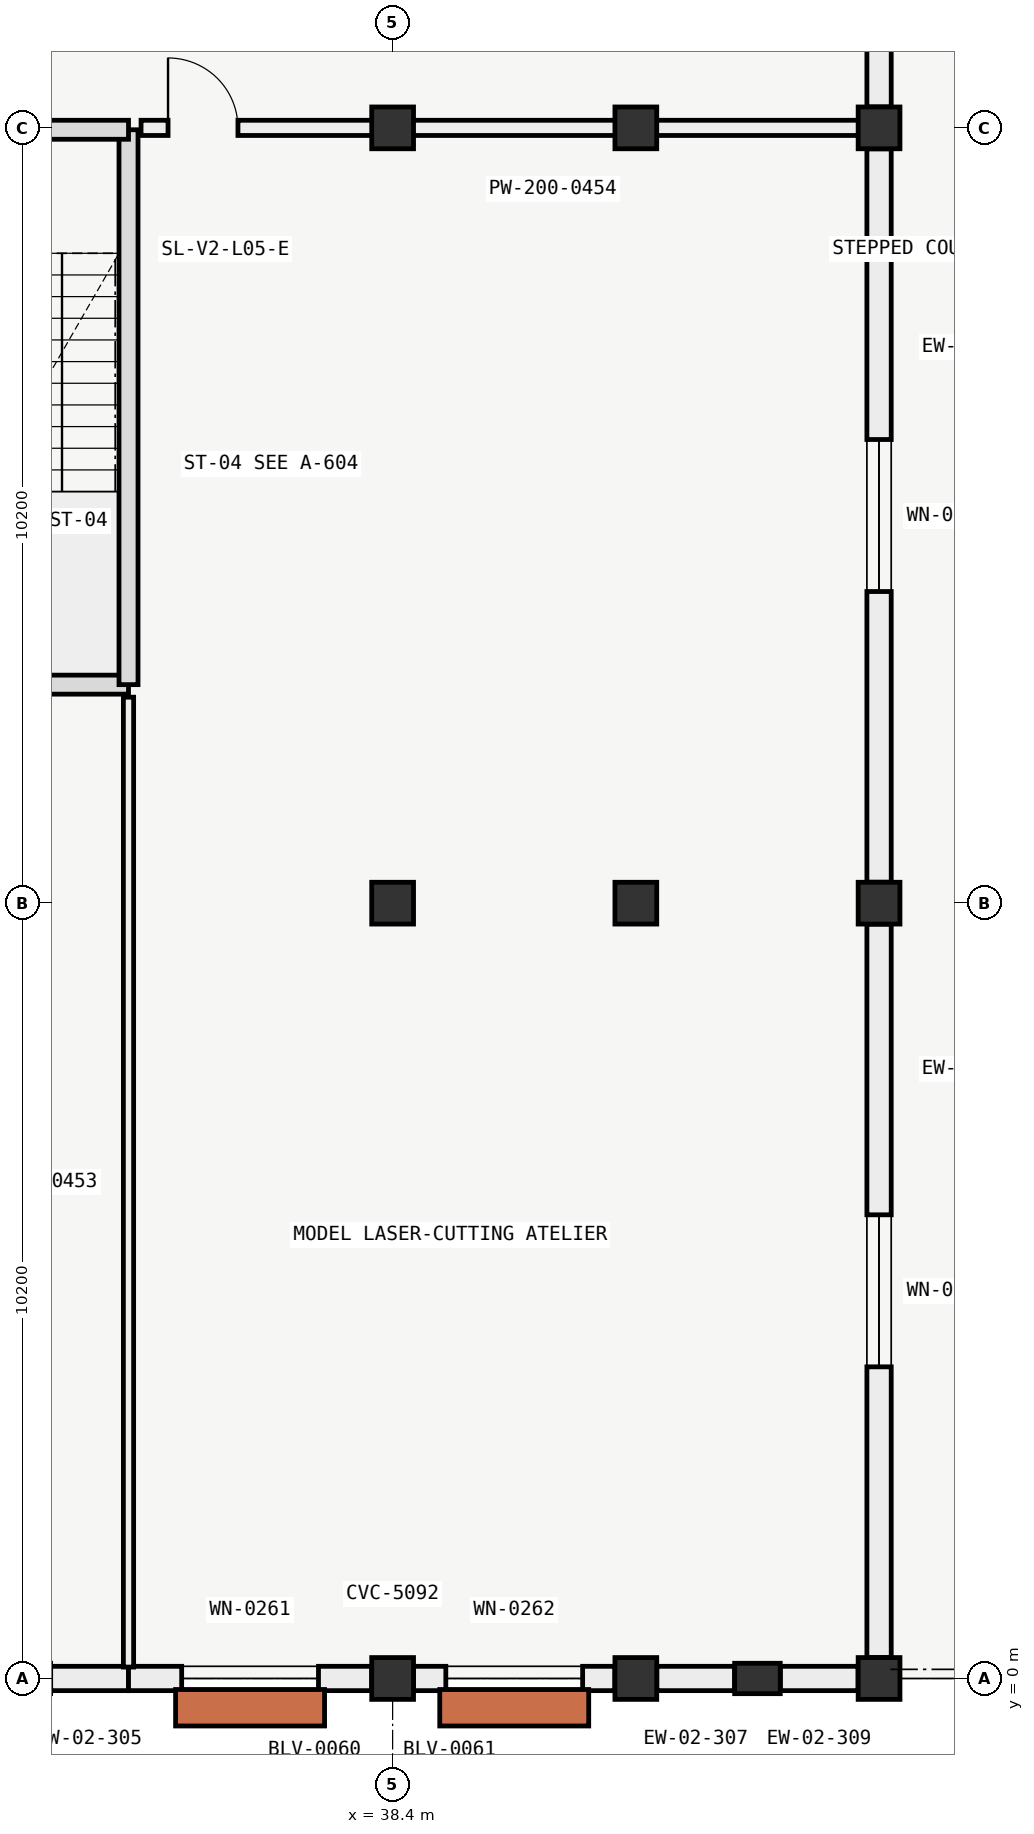
"""IFC4 building model, lengths in metres.
Left out: names, types, materials, properties, quantities, classifications, styles, units other than length and angle.
Written with IfcOpenShell. Run it as: python <this file> out.ifc"""

import sys

from ifc_helpers import new_model, si_unit, direction, frame, frame_2d, origin, origin_2d, place, context, subcontext, project, spatial, rectangle, extrude, element, fill, save


model = new_model("IFC4")
c1 = context("Model", 3, precision=1e-05, world=origin(), true_north=direction((0.0, 1.0)))
c2 = subcontext(c1, "Body", "Model", "MODEL_VIEW")
j1 = project(units=[si_unit("LENGTHUNIT", "METRE"), si_unit("PLANEANGLEUNIT", "RADIAN")], contexts=[c1])
p1 = place(None, origin())
s1 = spatial("IfcSite", under=j1, at=p1, CompositionType="ELEMENT")
p2 = place(p1, origin())
s2 = spatial("IfcBuilding", under=s1, at=p2, CompositionType="ELEMENT")
p3 = place(p2, frame((0.0, 0.0, 22.2)))
s3 = spatial("IfcBuildingStorey", under=s2, at=p3, CompositionType="ELEMENT", Elevation=22.2)
for number, where, z_axis, x_axis in (
    (1, (38.4, 0.0, 0.0), (0.0, 0.0, 1.0), (1.0, 0.0, 0.0)),
    (2, (38.4, 10.2, 0.0), (0.0, 0.0, 1.0), (1.0, 0.0, 0.0)),
    (3, (38.4, 20.4, 0.0), (0.0, 0.0, 1.0), (1.0, 0.0, 0.0)),
    (4, (41.6, 0.0, 0.0), (0.0, 0.0, 1.0), (1.0, 0.0, 0.0)),
    (5, (41.6, 10.2, 0.0), (0.0, 0.0, 1.0), (1.0, 0.0, 0.0)),
    (6, (41.6, 20.4, 0.0), (0.0, 0.0, 1.0), (1.0, 0.0, 0.0)),
    (7, (44.8, 0.0, 0.0), (0.0, 0.0, 1.0), (1.0, 0.0, 0.0)),
    (8, (44.8, 10.2, 0.0), (0.0, 0.0, 1.0), (1.0, 0.0, 0.0)),
    (9, (44.8, 20.4, 0.0), (0.0, 0.0, 1.0), (1.0, 0.0, 0.0)),
):
    element("IfcColumn", number, at=place(p3, frame(where, z_axis=z_axis, x_axis=x_axis)), inside=s3, PredefinedType="COLUMN", context=c2, shape_type="SweptSolid", body=[
        extrude(rectangle(XDim=0.55, YDim=0.55, at=origin_2d()), origin(), (0.0, 0.0, 1.0), 4.2),
    ])
p4 = place(p3, frame((43.2, 0.0, 0.0), z_axis=(0.0, 0.0, 1.0), x_axis=(0.0, 1.0, 0.0)))
e10 = element("IfcColumn", 10, at=p4, inside=s3, PredefinedType="PILASTER", context=c2, shape_type="SweptSolid", body=[
    extrude(rectangle(XDim=0.4, YDim=0.6, at=origin_2d()), origin(), (0.0, 0.0, 1.0), 4.2),
])
p5 = place(p3, frame((34.925, 0.0, 0.0), z_axis=(0.0, 0.0, 1.0), x_axis=(-1.0, 0.0, 0.0)))
e11 = element("IfcWall", 11, at=p5, inside=s3, PredefinedType="SOLIDWALL", context=c2, shape_type="SweptSolid", body=[
    extrude(rectangle(XDim=1.024, YDim=0.32, at=frame_2d((0.512, 0.0))), origin(), (0.0, 0.0, 1.0), 3.3),
])
p6 = place(p3, frame((38.124, 0.0, 0.0), z_axis=(0.0, 0.0, 1.0), x_axis=(-1.0, 0.0, 0.0)))
e12 = element("IfcWall", 12, at=p6, inside=s3, PredefinedType="SOLIDWALL", context=c2, shape_type="SweptSolid", body=[
    extrude(rectangle(XDim=3.199, YDim=0.32, at=frame_2d((1.6, 0.0))), origin(), (0.0, 0.0, 1.0), 3.3),
])
p7 = place(p6, frame((0.699, 0.0, 0.8)))
e13 = element("IfcOpeningElement", 13, at=p7, cuts=e12, PredefinedType="OPENING", context=c2, shape_type="SweptSolid", body=[
    extrude(rectangle(XDim=1.8, YDim=2.1, at=frame_2d((0.9, 1.05))), frame((0.0, 0.17, 0.0), z_axis=(0.0, -1.0, 0.0), x_axis=(1.0, 0.0, 0.0)), (0.0, 0.0, 1.0), 0.34),
])
p8 = place(p3, frame((42.899, 0.0, 0.0), z_axis=(0.0, 0.0, 1.0), x_axis=(-1.0, 0.0, 0.0)))
e14 = element("IfcWall", 14, at=p8, inside=s3, PredefinedType="SOLIDWALL", context=c2, shape_type="SweptSolid", body=[
    extrude(rectangle(XDim=1.023, YDim=0.32, at=frame_2d((0.511, 0.0))), origin(), (0.0, 0.0, 1.0), 3.3),
])
p9 = place(p3, frame((41.324, 0.0, 0.0), z_axis=(0.0, 0.0, 1.0), x_axis=(-1.0, 0.0, 0.0)))
e15 = element("IfcWall", 15, at=p9, inside=s3, PredefinedType="SOLIDWALL", context=c2, shape_type="SweptSolid", body=[
    extrude(rectangle(XDim=2.648, YDim=0.32, at=frame_2d((1.324, 0.0))), origin(), (0.0, 0.0, 1.0), 3.3),
])
p10 = place(p9, frame((0.424, 0.0, 0.8)))
e16 = element("IfcOpeningElement", 16, at=p10, cuts=e15, PredefinedType="OPENING", context=c2, shape_type="SweptSolid", body=[
    extrude(rectangle(XDim=1.8, YDim=2.1, at=frame_2d((0.9, 1.05))), frame((0.0, 0.17, 0.0), z_axis=(0.0, -1.0, 0.0), x_axis=(1.0, 0.0, 0.0)), (0.0, 0.0, 1.0), 0.34),
])
p11 = place(p3, frame((44.524, 0.0, 0.0), z_axis=(0.0, 0.0, 1.0), x_axis=(-1.0, 0.0, 0.0)))
e17 = element("IfcWall", 17, at=p11, inside=s3, PredefinedType="SOLIDWALL", context=c2, shape_type="SweptSolid", body=[
    extrude(rectangle(XDim=1.023, YDim=0.32, at=frame_2d((0.511, 0.0))), origin(), (0.0, 0.0, 1.0), 3.3),
])
p12 = place(p3, frame((44.8, 9.924, 0.0), z_axis=(0.0, 0.0, 1.0), x_axis=(0.0, -1.0, 0.0)))
e18 = element("IfcWall", 18, at=p12, inside=s3, PredefinedType="SOLIDWALL", context=c2, shape_type="SweptSolid", body=[
    extrude(rectangle(XDim=9.648, YDim=0.32, at=frame_2d((4.824, 0.0))), origin(), (0.0, 0.0, 1.0), 3.3),
])
p13 = place(p12, frame((3.824, 0.0, 0.85)))
e19 = element("IfcOpeningElement", 19, at=p13, cuts=e18, PredefinedType="OPENING", context=c2, shape_type="SweptSolid", body=[
    extrude(rectangle(XDim=2.0, YDim=1.35, at=frame_2d((1.0, 0.675))), frame((0.0, 0.17, 0.0), z_axis=(0.0, -1.0, 0.0), x_axis=(1.0, 0.0, 0.0)), (0.0, 0.0, 1.0), 0.34),
])
p14 = place(p3, frame((44.8, 20.124, 0.0), z_axis=(0.0, 0.0, 1.0), x_axis=(0.0, -1.0, 0.0)))
e20 = element("IfcWall", 20, at=p14, inside=s3, PredefinedType="SOLIDWALL", context=c2, shape_type="SweptSolid", body=[
    extrude(rectangle(XDim=9.648, YDim=0.32, at=frame_2d((4.824, 0.0))), origin(), (0.0, 0.0, 1.0), 3.3),
])
p15 = place(p14, frame((3.824, 0.0, 0.85)))
e21 = element("IfcOpeningElement", 21, at=p15, cuts=e20, PredefinedType="OPENING", context=c2, shape_type="SweptSolid", body=[
    extrude(rectangle(XDim=2.0, YDim=1.35, at=frame_2d((1.0, 0.675))), frame((0.0, 0.17, 0.0), z_axis=(0.0, -1.0, 0.0), x_axis=(1.0, 0.0, 0.0)), (0.0, 0.0, 1.0), 0.34),
])
p16 = place(p3, frame((44.8, 23.95, 0.0), z_axis=(0.0, 0.0, 1.0), x_axis=(0.0, -1.0, 0.0)))
e22 = element("IfcWall", 22, at=p16, inside=s3, PredefinedType="SOLIDWALL", context=c2, shape_type="SweptSolid", body=[
    extrude(rectangle(XDim=3.274, YDim=0.32, at=frame_2d((1.637, 0.0))), origin(), (0.0, 0.0, 1.0), 3.3),
])
p17 = place(p16, frame((0.787, 0.0, 0.0)))
e23 = element("IfcOpeningElement", 23, at=p17, cuts=e22, PredefinedType="OPENING", context=c2, shape_type="SweptSolid", body=[
    extrude(rectangle(XDim=1.7, YDim=2.15, at=frame_2d((0.85, 1.075))), frame((0.0, 0.17, 0.0), z_axis=(0.0, -1.0, 0.0), x_axis=(1.0, 0.0, 0.0)), (0.0, 0.0, 1.0), 0.34),
])
p18 = place(p3, frame((31.475, 13.075, 0.0), z_axis=(0.0, 0.0, 1.0), x_axis=(1.0, 0.0, 0.0)))
e24 = element("IfcWall", 24, at=p18, inside=s3, PredefinedType="SOLIDWALL", context=c2, shape_type="SweptSolid", body=[
    extrude(rectangle(XDim=3.45, YDim=0.25, at=frame_2d((1.725, 0.0))), origin(), (0.0, 0.0, 1.0), 3.975),
])
p19 = place(p3, frame((34.925, 13.075, 0.0), z_axis=(0.0, 0.0, 1.0), x_axis=(0.0, 1.0, 0.0)))
e25 = element("IfcWall", 25, at=p19, inside=s3, PredefinedType="SOLIDWALL", context=c2, shape_type="SweptSolid", body=[
    extrude(rectangle(XDim=7.3, YDim=0.25, at=frame_2d((3.65, 0.0))), origin(), (0.0, 0.0, 1.0), 3.975),
])
p20 = place(p3, frame((34.925, 20.375, 0.0), z_axis=(0.0, 0.0, 1.0), x_axis=(-1.0, 0.0, 0.0)))
e26 = element("IfcWall", 26, at=p20, inside=s3, PredefinedType="SOLIDWALL", context=c2, shape_type="SweptSolid", body=[
    extrude(rectangle(XDim=3.45, YDim=0.25, at=frame_2d((1.725, 0.0))), origin(), (0.0, 0.0, 1.0), 3.975),
])
p21 = place(p20, frame((1.175, 0.0, 0.0)))
e27 = element("IfcOpeningElement", 27, at=p21, cuts=e26, PredefinedType="OPENING", context=c2, shape_type="SweptSolid", body=[
    extrude(rectangle(XDim=1.1, YDim=2.2, at=frame_2d((0.55, 1.1))), frame((0.0, 0.135, 0.0), z_axis=(0.0, -1.0, 0.0), x_axis=(1.0, 0.0, 0.0)), (0.0, 0.0, 1.0), 0.27),
])
p22 = place(p3, frame((34.925, 0.15, 0.0), z_axis=(0.0, 0.0, 1.0), x_axis=(0.0, 1.0, 0.0)))
e28 = element("IfcWall", 28, at=p22, inside=s3, PredefinedType="PARTITIONING", context=c2, shape_type="SweptSolid", body=[
    extrude(rectangle(XDim=12.76, YDim=0.135, at=frame_2d((6.38, 0.0))), origin(), (0.0, 0.0, 1.0), 3.405),
])
p23 = place(p3, frame((35.09, 20.4, 0.0), z_axis=(0.0, 0.0, 1.0), x_axis=(1.0, 0.0, 0.0)))
e29 = element("IfcWall", 29, at=p23, inside=s3, PredefinedType="PARTITIONING", context=c2, shape_type="SweptSolid", body=[
    extrude(rectangle(XDim=9.56, YDim=0.2, at=frame_2d((4.78, 0.0))), origin(), (0.0, 0.0, 1.0), 3.305),
])
p24 = place(p23, frame((0.355, 0.0, 0.0)))
e30 = element("IfcOpeningElement", 30, at=p24, cuts=e29, PredefinedType="OPENING", context=c2, shape_type="SweptSolid", body=[
    extrude(rectangle(XDim=0.92, YDim=2.1, at=frame_2d((0.46, 1.05))), frame((0.0, 0.11, 0.0), z_axis=(0.0, -1.0, 0.0), x_axis=(1.0, 0.0, 0.0)), (0.0, 0.0, 1.0), 0.22),
])
p25 = place(p7, origin())
e31 = element("IfcWindow", 31, at=p25, inside=s3, PartitioningType="SINGLE_PANEL", PredefinedType="WINDOW", context=c2, shape_type="SweptSolid", body=[
    extrude(rectangle(XDim=1.8, YDim=2.1, at=frame_2d((0.9, 1.05))), frame((0.0, 0.03, 0.0), z_axis=(0.0, -1.0, 0.0), x_axis=(1.0, 0.0, 0.0)), (0.0, 0.0, 1.0), 0.06),
])
fill(e13, e31)
p26 = place(p10, origin())
e32 = element("IfcWindow", 32, at=p26, inside=s3, PartitioningType="SINGLE_PANEL", PredefinedType="WINDOW", context=c2, shape_type="SweptSolid", body=[
    extrude(rectangle(XDim=1.8, YDim=2.1, at=frame_2d((0.9, 1.05))), frame((0.0, 0.03, 0.0), z_axis=(0.0, -1.0, 0.0), x_axis=(1.0, 0.0, 0.0)), (0.0, 0.0, 1.0), 0.06),
])
fill(e16, e32)
p27 = place(p13, origin())
e33 = element("IfcWindow", 33, at=p27, inside=s3, PartitioningType="SINGLE_PANEL", PredefinedType="WINDOW", context=c2, shape_type="SweptSolid", body=[
    extrude(rectangle(XDim=2.0, YDim=1.35, at=frame_2d((1.0, 0.675))), frame((0.0, 0.03, 0.0), z_axis=(0.0, -1.0, 0.0), x_axis=(1.0, 0.0, 0.0)), (0.0, 0.0, 1.0), 0.06),
])
fill(e19, e33)
p28 = place(p15, origin())
e34 = element("IfcWindow", 34, at=p28, inside=s3, PartitioningType="SINGLE_PANEL", PredefinedType="WINDOW", context=c2, shape_type="SweptSolid", body=[
    extrude(rectangle(XDim=2.0, YDim=1.35, at=frame_2d((1.0, 0.675))), frame((0.0, 0.03, 0.0), z_axis=(0.0, -1.0, 0.0), x_axis=(1.0, 0.0, 0.0)), (0.0, 0.0, 1.0), 0.06),
])
fill(e21, e34)
p29 = place(p24, origin())
e35 = element("IfcDoor", 35, at=p29, inside=s3, OperationType="SINGLE_SWING_LEFT", PredefinedType="DOOR", context=c2, shape_type="SweptSolid", body=[
    extrude(rectangle(XDim=0.92, YDim=2.1, at=frame_2d((0.46, 1.05))), frame((0.0, 0.025, 0.0), z_axis=(0.0, -1.0, 0.0), x_axis=(1.0, 0.0, 0.0)), (0.0, 0.0, 1.0), 0.05),
])
fill(e30, e35)
save(model, sys.argv[1])
